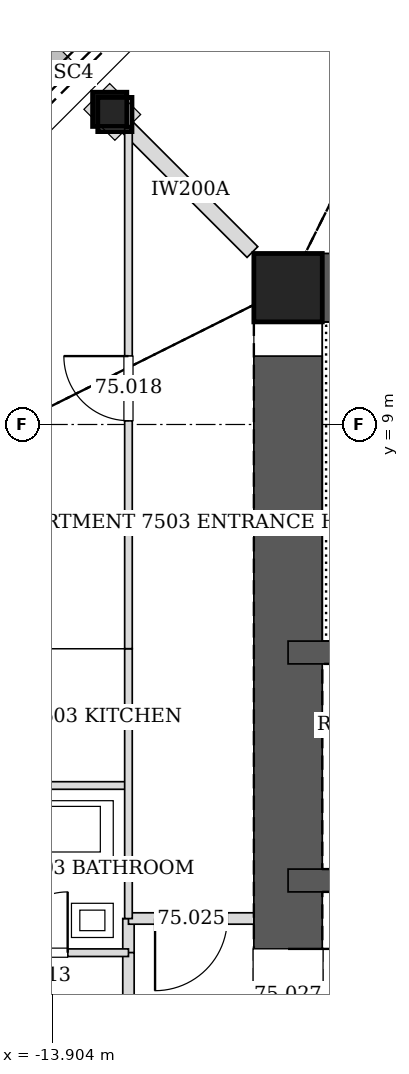
"""IFC4 building model, lengths in metres.
Left out: names, types, materials, properties, quantities, classifications, styles, units other than length and angle.
Written with IfcOpenShell. Run it as: python <this file> out.ifc"""

import sys

from ifc_helpers import new_model, si_unit, direction, frame, frame_2d, origin, origin_2d, place, context, subcontext, project, spatial, rectangle, hollow_rectangle, extrude, element, fill, save


model = new_model("IFC4")
c1 = context("Model", 3, precision=1e-05, world=origin(), true_north=direction((0.0, 1.0)))
c2 = subcontext(c1, "Body", "Model", "MODEL_VIEW")
j1 = project(units=[si_unit("LENGTHUNIT", "METRE"), si_unit("PLANEANGLEUNIT", "RADIAN")], contexts=[c1])
p1 = place(None, origin())
s1 = spatial("IfcSite", under=j1, at=p1, CompositionType="ELEMENT")
p2 = place(p1, origin())
s2 = spatial("IfcBuilding", under=s1, at=p2, CompositionType="ELEMENT")
p3 = place(p2, frame((0.0, 0.0, 304.8)))
s3 = spatial("IfcBuildingStorey", under=s2, at=p3, CompositionType="ELEMENT", Elevation=304.8)
p4 = place(p3, frame((-13.147, 13.147, 0.0), z_axis=(0.01995470925, -0.01995470925, 0.999601730269), x_axis=(0.707106781187, 0.707106781187, 0.0)))
e1 = element("IfcColumn", 1, at=p4, inside=s3, PredefinedType="COLUMN", context=c2, shape_type="SweptSolid", body=[
    extrude(hollow_rectangle(XDim=0.45, YDim=0.45, WallThickness=0.02, at=origin_2d()), origin(), (0.0, 0.0, 1.0), 3.401),
])
p5 = place(p3, frame((-10.8, 10.8, 0.0), z_axis=(0.0, 0.0, 1.0), x_axis=(1.0, 0.0, 0.0)))
e2 = element("IfcColumn", 2, at=p5, inside=s3, PredefinedType="COLUMN", context=c2, shape_type="SweptSolid", body=[
    extrude(hollow_rectangle(XDim=0.9, YDim=0.9, WallThickness=0.04, at=origin_2d()), origin(), (0.0, 0.0, 1.0), 3.4),
])
p6 = place(p3, frame((10.8, 10.8, 0.0), z_axis=(0.0, 0.0, 1.0), x_axis=(-1.0, 0.0, 0.0)))
e3 = element("IfcWall", 3, at=p6, inside=s3, PredefinedType="SOLIDWALL", context=c2, shape_type="SweptSolid", body=[
    extrude(rectangle(XDim=21.6, YDim=0.9, at=frame_2d((10.8, 0.0))), origin(), (0.0, 0.0, 1.0), 3.4),
])
p7 = place(p6, frame((10.05, 0.0, 0.0)))
e4 = element("IfcOpeningElement", 4, at=p7, cuts=e3, PredefinedType="OPENING", context=c2, shape_type="SweptSolid", body=[
    extrude(rectangle(XDim=1.5, YDim=2.1, at=frame_2d((0.75, 1.05))), frame((0.0, 0.46, 0.0), z_axis=(0.0, -1.0, 0.0), x_axis=(1.0, 0.0, 0.0)), (0.0, 0.0, 1.0), 0.92),
])
p8 = place(p3, frame((-10.8, 10.8, 0.0), z_axis=(0.0, 0.0, 1.0), x_axis=(0.0, -1.0, 0.0)))
e5 = element("IfcWall", 5, at=p8, inside=s3, PredefinedType="SOLIDWALL", context=c2, shape_type="SweptSolid", body=[
    extrude(rectangle(XDim=21.6, YDim=0.9, at=frame_2d((10.8, 0.0))), origin(), (0.0, 0.0, 1.0), 3.4),
])
p9 = place(p8, frame((8.7, 0.0, 0.0)))
e6 = element("IfcOpeningElement", 6, at=p9, cuts=e5, PredefinedType="OPENING", context=c2, shape_type="SweptSolid", body=[
    extrude(rectangle(XDim=1.2, YDim=2.1, at=frame_2d((0.6, 1.05))), frame((0.0, 0.46, 0.0), z_axis=(0.0, -1.0, 0.0), x_axis=(1.0, 0.0, 0.0)), (0.0, 0.0, 1.0), 0.92),
])
p10 = place(p8, frame((11.7, 0.0, 0.0)))
e7 = element("IfcOpeningElement", 7, at=p10, cuts=e5, PredefinedType="OPENING", context=c2, shape_type="SweptSolid", body=[
    extrude(rectangle(XDim=1.2, YDim=2.1, at=frame_2d((0.6, 1.05))), frame((0.0, 0.46, 0.0), z_axis=(0.0, -1.0, 0.0), x_axis=(1.0, 0.0, 0.0)), (0.0, 0.0, 1.0), 0.92),
])
p11 = place(p3, frame((-10.8, 3.0, 0.0), z_axis=(0.0, 0.0, 1.0), x_axis=(1.0, 0.0, 0.0)))
e8 = element("IfcWall", 8, at=p11, inside=s3, PredefinedType="SOLIDWALL", context=c2, shape_type="SweptSolid", body=[
    extrude(rectangle(XDim=21.6, YDim=0.3, at=frame_2d((10.8, 0.0))), origin(), (0.0, 0.0, 1.0), 3.4),
])
p12 = place(p11, frame((1.65, 0.0, 0.0)))
e9 = element("IfcOpeningElement", 9, at=p12, cuts=e8, PredefinedType="OPENING", context=c2, shape_type="SweptSolid", body=[
    extrude(rectangle(XDim=0.9, YDim=2.1, at=frame_2d((0.45, 1.05))), frame((0.0, 0.16, 0.0), z_axis=(0.0, -1.0, 0.0), x_axis=(1.0, 0.0, 0.0)), (0.0, 0.0, 1.0), 0.32),
])
p13 = place(p11, frame((4.55, 0.0, 0.0)))
e10 = element("IfcOpeningElement", 10, at=p13, cuts=e8, PredefinedType="OPENING", context=c2, shape_type="SweptSolid", body=[
    extrude(rectangle(XDim=0.9, YDim=2.1, at=frame_2d((0.45, 1.05))), frame((0.0, 0.16, 0.0), z_axis=(0.0, -1.0, 0.0), x_axis=(1.0, 0.0, 0.0)), (0.0, 0.0, 1.0), 0.32),
])
p14 = place(p11, frame((13.25, 0.0, 0.0)))
e11 = element("IfcOpeningElement", 11, at=p14, cuts=e8, PredefinedType="OPENING", context=c2, shape_type="SweptSolid", body=[
    extrude(rectangle(XDim=0.9, YDim=2.1, at=frame_2d((0.45, 1.05))), frame((0.0, 0.16, 0.0), z_axis=(0.0, -1.0, 0.0), x_axis=(1.0, 0.0, 0.0)), (0.0, 0.0, 1.0), 0.32),
])
p15 = place(p11, frame((7.45, 0.0, 0.0)))
e12 = element("IfcOpeningElement", 12, at=p15, cuts=e8, PredefinedType="OPENING", context=c2, shape_type="SweptSolid", body=[
    extrude(rectangle(XDim=0.9, YDim=2.1, at=frame_2d((0.45, 1.05))), frame((0.0, 0.16, 0.0), z_axis=(0.0, -1.0, 0.0), x_axis=(1.0, 0.0, 0.0)), (0.0, 0.0, 1.0), 0.32),
])
p16 = place(p11, frame((16.15, 0.0, 0.0)))
e13 = element("IfcOpeningElement", 13, at=p16, cuts=e8, PredefinedType="OPENING", context=c2, shape_type="SweptSolid", body=[
    extrude(rectangle(XDim=0.9, YDim=2.1, at=frame_2d((0.45, 1.05))), frame((0.0, 0.16, 0.0), z_axis=(0.0, -1.0, 0.0), x_axis=(1.0, 0.0, 0.0)), (0.0, 0.0, 1.0), 0.32),
])
p17 = place(p11, frame((19.05, 0.0, 0.0)))
e14 = element("IfcOpeningElement", 14, at=p17, cuts=e8, PredefinedType="OPENING", context=c2, shape_type="SweptSolid", body=[
    extrude(rectangle(XDim=0.9, YDim=2.1, at=frame_2d((0.45, 1.05))), frame((0.0, 0.16, 0.0), z_axis=(0.0, -1.0, 0.0), x_axis=(1.0, 0.0, 0.0)), (0.0, 0.0, 1.0), 0.32),
])
p18 = place(p3, frame((-10.8, 6.0, 0.0), z_axis=(0.0, 0.0, 1.0), x_axis=(1.0, 0.0, 0.0)))
e15 = element("IfcWall", 15, at=p18, inside=s3, PredefinedType="SOLIDWALL", context=c2, shape_type="SweptSolid", body=[
    extrude(rectangle(XDim=21.6, YDim=0.3, at=frame_2d((10.8, 0.0))), origin(), (0.0, 0.0, 1.0), 3.4),
])
p19 = place(p18, frame((10.25, 0.0, 0.0)))
e16 = element("IfcOpeningElement", 16, at=p19, cuts=e15, PredefinedType="OPENING", context=c2, shape_type="SweptSolid", body=[
    extrude(rectangle(XDim=1.1, YDim=2.1, at=frame_2d((0.55, 1.05))), frame((0.0, 0.16, 0.0), z_axis=(0.0, -1.0, 0.0), x_axis=(1.0, 0.0, 0.0)), (0.0, 0.0, 1.0), 0.32),
])
p20 = place(p3, frame((-12.9, 2.5, 0.0), z_axis=(0.0, 0.0, 1.0), x_axis=(0.0, -1.0, 0.0)))
e17 = element("IfcWall", 17, at=p20, inside=s3, PredefinedType="PARTITIONING", context=c2, shape_type="SweptSolid", body=[
    extrude(rectangle(XDim=0.451, YDim=0.15, at=frame_2d((0.226, 0.0))), origin(), (0.0, 0.0, 1.0), 3.2),
])
p21 = place(p3, frame((-12.9, 2.051, 0.0), z_axis=(0.0, 0.0, 1.0), x_axis=(0.0, -1.0, 0.0)))
e18 = element("IfcWall", 18, at=p21, inside=s3, PredefinedType="PARTITIONING", context=c2, shape_type="SweptSolid", body=[
    extrude(rectangle(XDim=9.602, YDim=0.15, at=frame_2d((4.801, 0.0))), origin(), (0.0, 0.0, 1.0), 2.349),
])
p22 = place(p3, frame((-11.25, 2.5, 0.0), z_axis=(0.0, 0.0, 1.0), x_axis=(-1.0, 0.0, 0.0)))
e19 = element("IfcWall", 19, at=p22, inside=s3, PredefinedType="PARTITIONING", context=c2, shape_type="SweptSolid", body=[
    extrude(rectangle(XDim=1.65, YDim=0.15, at=frame_2d((0.825, 0.0))), origin(), (0.0, 0.0, 1.0), 3.2),
])
p23 = place(p22, frame((0.35, 0.0, 0.0)))
e20 = element("IfcOpeningElement", 20, at=p23, cuts=e19, PredefinedType="OPENING", context=c2, shape_type="SweptSolid", body=[
    extrude(rectangle(XDim=0.95, YDim=2.1, at=frame_2d((0.475, 1.05))), frame((0.0, 0.085, 0.0), z_axis=(0.0, -1.0, 0.0), x_axis=(1.0, 0.0, 0.0)), (0.0, 0.0, 1.0), 0.17),
])
p24 = place(p3, frame((-12.901, 12.901, 0.0), z_axis=(0.0, 0.0, 1.0), x_axis=(0.707106781187, -0.707106781187, 0.0)))
e21 = element("IfcWall", 21, at=p24, inside=s3, PredefinedType="PARTITIONING", context=c2, shape_type="SweptSolid", body=[
    extrude(rectangle(XDim=2.308, YDim=0.2, at=frame_2d((1.154, 0.0))), origin(), (0.0, 0.0, 1.0), 2.591),
])
p25 = place(p3, frame((-15.3, 4.25, 0.0), z_axis=(0.0, 0.0, 1.0), x_axis=(1.0, 0.0, 0.0)))
e22 = element("IfcWall", 22, at=p25, inside=s3, PredefinedType="PARTITIONING", context=c2, shape_type="SweptSolid", body=[
    extrude(rectangle(XDim=2.4, YDim=0.1, at=frame_2d((1.2, 0.0))), origin(), (0.0, 0.0, 1.0), 2.662),
])
p26 = place(p3, frame((-12.9, 6.05, 0.0), z_axis=(0.0, 0.0, 1.0), x_axis=(0.0, -1.0, 0.0)))
e23 = element("IfcWall", 23, at=p26, inside=s3, PredefinedType="PARTITIONING", context=c2, shape_type="SweptSolid", body=[
    extrude(rectangle(XDim=3.551, YDim=0.1, at=frame_2d((1.775, 0.0))), origin(), (0.0, 0.0, 1.0), 3.2),
])
p27 = place(p3, frame((-15.3, 2.05, 0.0), z_axis=(0.0, 0.0, 1.0), x_axis=(1.0, 0.0, 0.0)))
e24 = element("IfcWall", 24, at=p27, inside=s3, PredefinedType="PARTITIONING", context=c2, shape_type="SweptSolid", body=[
    extrude(rectangle(XDim=2.4, YDim=0.1, at=frame_2d((1.2, 0.0))), origin(), (0.0, 0.0, 1.0), 2.662),
])
p28 = place(p27, frame((0.8, 0.0, 0.0)))
e25 = element("IfcOpeningElement", 25, at=p28, cuts=e24, PredefinedType="OPENING", context=c2, shape_type="SweptSolid", body=[
    extrude(rectangle(XDim=0.8, YDim=2.1, at=frame_2d((0.4, 1.05))), frame((0.0, 0.06, 0.0), z_axis=(0.0, -1.0, 0.0), x_axis=(1.0, 0.0, 0.0)), (0.0, 0.0, 1.0), 0.12),
])
p29 = place(p3, frame((-12.9, 6.05, 0.0), z_axis=(0.0, 0.0, 1.0), x_axis=(0.0, 1.0, 0.0)))
e26 = element("IfcWall", 26, at=p29, inside=s3, PredefinedType="PARTITIONING", context=c2, shape_type="SweptSolid", body=[
    extrude(rectangle(XDim=6.85, YDim=0.1, at=frame_2d((3.425, 0.0))), origin(), (0.0, 0.0, 1.0), 2.436),
])
p30 = place(p29, frame((3.0, 0.0, 0.0)))
e27 = element("IfcOpeningElement", 27, at=p30, cuts=e26, PredefinedType="OPENING", context=c2, shape_type="SweptSolid", body=[
    extrude(rectangle(XDim=0.85, YDim=2.1, at=frame_2d((0.425, 1.05))), frame((0.0, 0.06, 0.0), z_axis=(0.0, -1.0, 0.0), x_axis=(1.0, 0.0, 0.0)), (0.0, 0.0, 1.0), 0.12),
])
p31 = place(p28, origin())
e28 = element("IfcDoor", 28, at=p31, inside=s3, OperationType="SINGLE_SWING_RIGHT", PredefinedType="DOOR", context=c2, shape_type="SweptSolid", body=[
    extrude(rectangle(XDim=0.8, YDim=2.1, at=frame_2d((0.4, 1.05))), frame((0.0, 0.025, 0.0), z_axis=(0.0, -1.0, 0.0), x_axis=(1.0, 0.0, 0.0)), (0.0, 0.0, 1.0), 0.05),
])
fill(e25, e28)
p32 = place(p30, origin())
e29 = element("IfcDoor", 29, at=p32, inside=s3, OperationType="SINGLE_SWING_RIGHT", PredefinedType="DOOR", context=c2, shape_type="SweptSolid", body=[
    extrude(rectangle(XDim=0.85, YDim=2.1, at=frame_2d((0.425, 1.05))), frame((0.0, 0.025, 0.0), z_axis=(0.0, -1.0, 0.0), x_axis=(1.0, 0.0, 0.0)), (0.0, 0.0, 1.0), 0.05),
])
fill(e27, e29)
p33 = place(p23, origin())
e30 = element("IfcDoor", 30, at=p33, inside=s3, OperationType="SINGLE_SWING_RIGHT", PredefinedType="DOOR", context=c2, shape_type="SweptSolid", body=[
    extrude(rectangle(XDim=0.95, YDim=2.1, at=frame_2d((0.475, 1.05))), frame((0.0, 0.025, 0.0), z_axis=(0.0, -1.0, 0.0), x_axis=(1.0, 0.0, 0.0)), (0.0, 0.0, 1.0), 0.05),
])
fill(e20, e30)
p34 = place(p9, origin())
e31 = element("IfcDoor", 31, at=p34, inside=s3, OperationType="SINGLE_SWING_LEFT", PredefinedType="DOOR", context=c2, shape_type="SweptSolid", body=[
    extrude(rectangle(XDim=1.2, YDim=2.1, at=frame_2d((0.6, 1.05))), frame((0.0, 0.025, 0.0), z_axis=(0.0, -1.0, 0.0), x_axis=(1.0, 0.0, 0.0)), (0.0, 0.0, 1.0), 0.05),
])
fill(e6, e31)
save(model, sys.argv[1])
